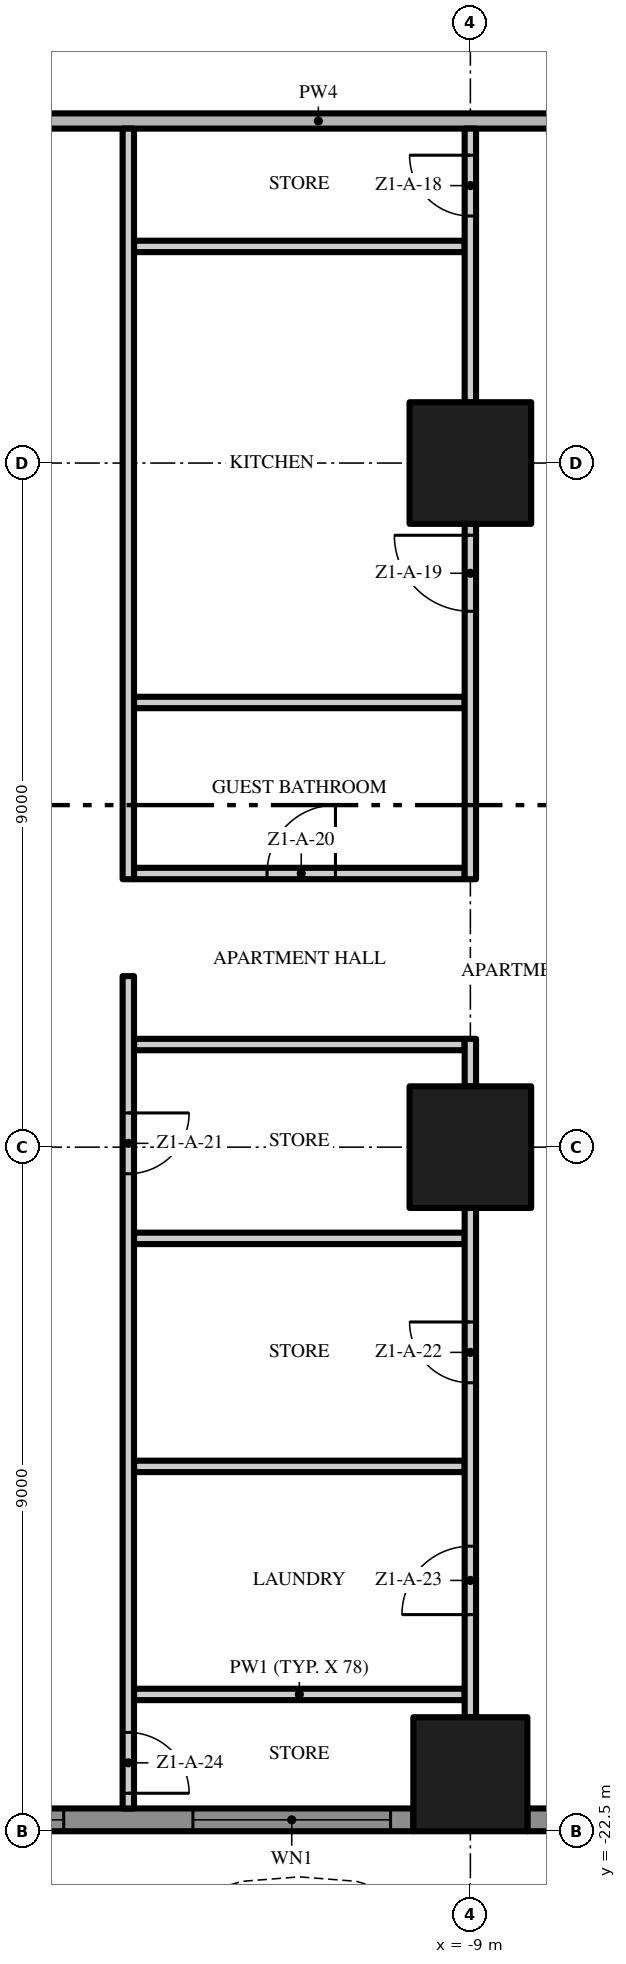
"""IFC4 building model, lengths in metres.
Left out: names, types, materials, properties, quantities, classifications, styles, units other than length and angle.
Written with IfcOpenShell. Run it as: python <this file> out.ifc"""

import sys

from ifc_helpers import new_model, si_unit, direction, frame, frame_2d, origin, origin_2d, place, context, subcontext, project, spatial, polyline, rectangle, outline, extrude, element, fill, save


model = new_model("IFC4")
c1 = context("Model", 3, precision=1e-05, world=origin(), true_north=direction((0.0, 1.0)))
c2 = subcontext(c1, "Body", "Model", "MODEL_VIEW")
j1 = project(units=[si_unit("LENGTHUNIT", "METRE"), si_unit("PLANEANGLEUNIT", "RADIAN")], contexts=[c1])
p1 = place(None, origin())
s1 = spatial("IfcSite", under=j1, at=p1, CompositionType="ELEMENT")
p2 = place(p1, origin())
s2 = spatial("IfcBuilding", under=s1, at=p2, CompositionType="ELEMENT")
p3 = place(p2, frame((0.0, 0.0, 15.0)))
s3 = spatial("IfcBuildingStorey", under=s2, at=p3, CompositionType="ELEMENT", Elevation=15.0)
p4 = place(p3, frame((-9.0, -13.5, 0.0), z_axis=(0.0, 0.0, 1.0), x_axis=(1.0, 0.0, 0.0)))
e1 = element("IfcColumn", 1, at=p4, inside=s3, PredefinedType="COLUMN", context=c2, shape_type="SweptSolid", body=[
    extrude(rectangle(XDim=1.6, YDim=1.6, at=origin_2d()), origin(), (0.0, 0.0, 1.0), 3.5),
])
p5 = place(p3, frame((-9.0, -21.75, 0.0), z_axis=(0.0, 0.0, 1.0), x_axis=(1.0, 0.0, 0.0)))
e2 = element("IfcColumn", 2, at=p5, inside=s3, PredefinedType="COLUMN", context=c2, shape_type="SweptSolid", body=[
    extrude(rectangle(XDim=1.5, YDim=1.5, at=origin_2d()), origin(), (0.0, 0.0, 1.0), 3.5),
])
p6 = place(p3, frame((-9.0, -4.5, 0.0), z_axis=(0.0, 0.0, 1.0), x_axis=(1.0, 0.0, 0.0)))
e3 = element("IfcColumn", 3, at=p6, inside=s3, PredefinedType="COLUMN", context=c2, shape_type="SweptSolid", body=[
    extrude(rectangle(XDim=1.6, YDim=1.6, at=origin_2d()), origin(), (0.0, 0.0, 1.0), 3.5),
])
p7 = place(p3, frame((-9.75, -22.35, 0.0), z_axis=(0.0, 0.0, 1.0), x_axis=(-1.0, 0.0, 0.0)))
e4 = element("IfcWall", 4, at=p7, inside=s3, PredefinedType="SOLIDWALL", context=c2, shape_type="SweptSolid", body=[
    extrude(rectangle(XDim=7.5, YDim=0.3, at=frame_2d((3.75, 0.0))), origin(), (0.0, 0.0, 1.0), 3.5),
])
p8 = place(p7, frame((4.6, 0.0, 0.45)))
e5 = element("IfcOpeningElement", 5, at=p8, cuts=e4, PredefinedType="OPENING", context=c2, shape_type="SweptSolid", body=[
    extrude(rectangle(XDim=2.6, YDim=2.65, at=frame_2d((1.3, 1.325))), frame((0.0, 0.16, 0.0), z_axis=(0.0, -1.0, 0.0), x_axis=(1.0, 0.0, 0.0)), (0.0, 0.0, 1.0), 0.32),
])
p9 = place(p7, frame((0.3, 0.0, 0.45)))
e6 = element("IfcOpeningElement", 6, at=p9, cuts=e4, PredefinedType="OPENING", context=c2, shape_type="SweptSolid", body=[
    extrude(rectangle(XDim=2.6, YDim=2.65, at=frame_2d((1.3, 1.325))), frame((0.0, 0.16, 0.0), z_axis=(0.0, -1.0, 0.0), x_axis=(1.0, 0.0, 0.0)), (0.0, 0.0, 1.0), 0.32),
])
p10 = place(p3, frame((-0.75, -22.35, 0.0), z_axis=(0.0, 0.0, 1.0), x_axis=(-1.0, 0.0, 0.0)))
e7 = element("IfcWall", 7, at=p10, inside=s3, PredefinedType="SOLIDWALL", context=c2, shape_type="SweptSolid", body=[
    extrude(rectangle(XDim=7.5, YDim=0.3, at=frame_2d((3.75, 0.0))), origin(), (0.0, 0.0, 1.0), 3.5),
])
p11 = place(p10, frame((4.6, 0.0, 0.45)))
e8 = element("IfcOpeningElement", 8, at=p11, cuts=e7, PredefinedType="OPENING", context=c2, shape_type="SweptSolid", body=[
    extrude(rectangle(XDim=2.6, YDim=2.65, at=frame_2d((1.3, 1.325))), frame((0.0, 0.16, 0.0), z_axis=(0.0, -1.0, 0.0), x_axis=(1.0, 0.0, 0.0)), (0.0, 0.0, 1.0), 0.32),
])
p12 = place(p10, frame((0.3, 0.0, 0.0)))
e9 = element("IfcOpeningElement", 9, at=p12, cuts=e7, PredefinedType="OPENING", context=c2, shape_type="SweptSolid", body=[
    extrude(rectangle(XDim=2.6, YDim=2.4, at=frame_2d((1.3, 1.2))), frame((0.0, 0.16, 0.0), z_axis=(0.0, -1.0, 0.0), x_axis=(1.0, 0.0, 0.0)), (0.0, 0.0, 1.0), 0.32),
])
p13 = place(p3, origin())
e10 = element("IfcWall", 10, at=p13, inside=s3, PredefinedType="USERDEFINED", context=c2, shape_type="SweptSolid", body=[
    extrude(outline(polyline([(-22.5, -24.3), (-21.0, -25.005), (-19.5, -25.441), (-18.75, -25.5), (-18.0, -25.441), (-16.5, -25.005), (-15.0, -24.3), (-13.5, -23.595), (-12.0, -23.159), (-11.25, -23.1), (-10.5, -23.159), (-9.0, -23.595), (-7.5, -24.3), (-6.0, -25.005), (-4.5, -25.441), (-3.75, -25.5), (-3.0, -25.441), (-1.5, -25.005), (0.0, -24.3), (1.5, -23.595), (3.0, -23.159), (3.75, -23.1), (4.5, -23.159), (6.0, -23.595), (7.5, -24.3), (9.0, -25.005), (10.5, -25.441), (11.25, -25.5), (12.0, -25.441), (13.5, -25.005), (15.0, -24.3), (16.5, -23.595), (18.0, -23.159), (18.75, -23.1), (19.5, -23.159), (21.0, -23.595), (22.5, -24.3), (22.606, -24.074), (21.089, -23.36), (19.545, -22.911), (18.75, -22.849), (17.955, -22.911), (16.411, -23.36), (14.894, -24.074), (13.411, -24.771), (11.955, -25.194), (11.25, -25.249), (10.545, -25.194), (9.089, -24.771), (7.606, -24.074), (6.089, -23.36), (4.545, -22.911), (3.75, -22.849), (2.955, -22.911), (1.411, -23.36), (-0.106, -24.074), (-1.589, -24.771), (-3.045, -25.194), (-3.75, -25.249), (-4.455, -25.194), (-5.911, -24.771), (-7.394, -24.074), (-8.911, -23.36), (-10.455, -22.911), (-11.25, -22.849), (-12.045, -22.911), (-13.589, -23.36), (-15.106, -24.074), (-16.589, -24.771), (-18.045, -25.194), (-18.75, -25.249), (-19.455, -25.194), (-20.911, -24.771), (-22.394, -24.074), (-22.5, -24.3)])), origin(), (0.0, 0.0, 1.0), 0.9),
])
for number, where, z_axis, x_axis in (
    (11, (-13.425, -20.7, 0.0), (0.0, 0.0, 1.0), (1.0, 0.0, 0.0)),
    (12, (-13.425, -17.7, 0.0), (0.0, 0.0, 1.0), (1.0, 0.0, 0.0)),
    (13, (-13.425, -14.7, 0.0), (0.0, 0.0, 1.0), (1.0, 0.0, 0.0)),
    (14, (-13.425, -12.15, 0.0), (0.0, 0.0, 1.0), (1.0, 0.0, 0.0)),
):
    element("IfcWall", number, at=place(p3, frame(where, z_axis=z_axis, x_axis=x_axis)), inside=s3, PredefinedType="PARTITIONING", context=c2, shape_type="SweptSolid", body=[
        extrude(rectangle(XDim=4.35, YDim=0.15, at=frame_2d((2.175, 0.0))), origin(), (0.0, 0.0, 1.0), 3.5),
    ])
p14 = place(p3, frame((-13.425, -9.9, 0.0), z_axis=(0.0, 0.0, 1.0), x_axis=(1.0, 0.0, 0.0)))
e15 = element("IfcWall", 15, at=p14, inside=s3, PredefinedType="PARTITIONING", context=c2, shape_type="SweptSolid", body=[
    extrude(rectangle(XDim=4.35, YDim=0.15, at=frame_2d((2.175, 0.0))), origin(), (0.0, 0.0, 1.0), 3.5),
])
p15 = place(p14, frame((1.75, 0.0, 0.0)))
e16 = element("IfcOpeningElement", 16, at=p15, cuts=e15, PredefinedType="OPENING", context=c2, shape_type="SweptSolid", body=[
    extrude(rectangle(XDim=0.9, YDim=2.1, at=frame_2d((0.45, 1.05))), frame((0.0, 0.085, 0.0), z_axis=(0.0, -1.0, 0.0), x_axis=(1.0, 0.0, 0.0)), (0.0, 0.0, 1.0), 0.17),
])
for number, where, z_axis, x_axis in (
    (17, (-13.425, -7.65, 0.0), (0.0, 0.0, 1.0), (1.0, 0.0, 0.0)),
    (18, (-13.425, -1.65, 0.0), (0.0, 0.0, 1.0), (1.0, 0.0, 0.0)),
):
    element("IfcWall", number, at=place(p3, frame(where, z_axis=z_axis, x_axis=x_axis)), inside=s3, PredefinedType="PARTITIONING", context=c2, shape_type="SweptSolid", body=[
        extrude(rectangle(XDim=4.35, YDim=0.15, at=frame_2d((2.175, 0.0))), origin(), (0.0, 0.0, 1.0), 3.5),
    ])
p16 = place(p3, frame((-17.4, 0.0, 0.0), z_axis=(0.0, 0.0, 1.0), x_axis=(1.0, 0.0, 0.0)))
e19 = element("IfcWall", 19, at=p16, inside=s3, PredefinedType="PARTITIONING", context=c2, shape_type="SweptSolid", body=[
    extrude(rectangle(XDim=12.8, YDim=0.2, at=frame_2d((6.4, 0.0))), origin(), (0.0, 0.0, 1.0), 3.5),
])
p17 = place(p3, frame((-13.5, -11.25, 0.0), z_axis=(0.0, 0.0, 1.0), x_axis=(0.0, -1.0, 0.0)))
e20 = element("IfcWall", 20, at=p17, inside=s3, PredefinedType="PARTITIONING", context=c2, shape_type="SweptSolid", body=[
    extrude(rectangle(XDim=10.95, YDim=0.15, at=frame_2d((5.475, 0.0))), origin(), (0.0, 0.0, 1.0), 3.5),
])
p18 = place(p17, frame((1.8, 0.0, 0.0)))
e21 = element("IfcOpeningElement", 21, at=p18, cuts=e20, PredefinedType="OPENING", context=c2, shape_type="SweptSolid", body=[
    extrude(rectangle(XDim=0.8, YDim=2.0, at=frame_2d((0.4, 1.0))), frame((0.0, 0.085, 0.0), z_axis=(0.0, -1.0, 0.0), x_axis=(1.0, 0.0, 0.0)), (0.0, 0.0, 1.0), 0.17),
])
p19 = place(p17, frame((9.95, 0.0, 0.0)))
e22 = element("IfcOpeningElement", 22, at=p19, cuts=e20, PredefinedType="OPENING", context=c2, shape_type="SweptSolid", body=[
    extrude(rectangle(XDim=0.8, YDim=2.0, at=frame_2d((0.4, 1.0))), frame((0.0, 0.085, 0.0), z_axis=(0.0, -1.0, 0.0), x_axis=(1.0, 0.0, 0.0)), (0.0, 0.0, 1.0), 0.17),
])
p20 = place(p3, frame((-13.5, -9.975, 0.0), z_axis=(0.0, 0.0, 1.0), x_axis=(0.0, 1.0, 0.0)))
e23 = element("IfcWall", 23, at=p20, inside=s3, PredefinedType="PARTITIONING", context=c2, shape_type="SweptSolid", body=[
    extrude(rectangle(XDim=9.875, YDim=0.15, at=frame_2d((4.938, 0.0))), origin(), (0.0, 0.0, 1.0), 3.5),
])
p21 = place(p3, frame((-9.0, -21.0, 0.0), z_axis=(0.0, 0.0, 1.0), x_axis=(0.0, 1.0, 0.0)))
e24 = element("IfcWall", 24, at=p21, inside=s3, PredefinedType="PARTITIONING", context=c2, shape_type="SweptSolid", body=[
    extrude(rectangle(XDim=6.7, YDim=0.15, at=frame_2d((3.35, 0.0))), origin(), (0.0, 0.0, 1.0), 3.5),
])
p22 = place(p21, frame((4.4, 0.0, 0.0)))
e25 = element("IfcOpeningElement", 25, at=p22, cuts=e24, PredefinedType="OPENING", context=c2, shape_type="SweptSolid", body=[
    extrude(rectangle(XDim=0.8, YDim=2.0, at=frame_2d((0.4, 1.0))), frame((0.0, 0.085, 0.0), z_axis=(0.0, -1.0, 0.0), x_axis=(1.0, 0.0, 0.0)), (0.0, 0.0, 1.0), 0.17),
])
p23 = place(p21, frame((1.35, 0.0, 0.0)))
e26 = element("IfcOpeningElement", 26, at=p23, cuts=e24, PredefinedType="OPENING", context=c2, shape_type="SweptSolid", body=[
    extrude(rectangle(XDim=0.9, YDim=2.1, at=frame_2d((0.45, 1.05))), frame((0.0, 0.085, 0.0), z_axis=(0.0, -1.0, 0.0), x_axis=(1.0, 0.0, 0.0)), (0.0, 0.0, 1.0), 0.17),
])
p24 = place(p3, frame((-9.0, -12.7, 0.0), z_axis=(0.0, 0.0, 1.0), x_axis=(0.0, 1.0, 0.0)))
e27 = element("IfcWall", 27, at=p24, inside=s3, PredefinedType="PARTITIONING", context=c2, shape_type="SweptSolid", body=[
    extrude(rectangle(XDim=0.625, YDim=0.15, at=frame_2d((0.312, 0.0))), origin(), (0.0, 0.0, 1.0), 3.5),
])
p25 = place(p3, frame((-9.0, -9.975, 0.0), z_axis=(0.0, 0.0, 1.0), x_axis=(0.0, 1.0, 0.0)))
e28 = element("IfcWall", 28, at=p25, inside=s3, PredefinedType="PARTITIONING", context=c2, shape_type="SweptSolid", body=[
    extrude(rectangle(XDim=4.675, YDim=0.15, at=frame_2d((2.337, 0.0))), origin(), (0.0, 0.0, 1.0), 3.5),
])
p26 = place(p25, frame((3.525, 0.0, 0.0)))
e29 = element("IfcOpeningElement", 29, at=p26, cuts=e28, PredefinedType="OPENING", context=c2, shape_type="SweptSolid", body=[
    extrude(rectangle(XDim=1.0, YDim=2.4, at=frame_2d((0.5, 1.2))), frame((0.0, 0.085, 0.0), z_axis=(0.0, -1.0, 0.0), x_axis=(1.0, 0.0, 0.0)), (0.0, 0.0, 1.0), 0.17),
])
p27 = place(p3, frame((-9.0, -3.7, 0.0), z_axis=(0.0, 0.0, 1.0), x_axis=(0.0, 1.0, 0.0)))
e30 = element("IfcWall", 30, at=p27, inside=s3, PredefinedType="PARTITIONING", context=c2, shape_type="SweptSolid", body=[
    extrude(rectangle(XDim=3.6, YDim=0.15, at=frame_2d((1.8, 0.0))), origin(), (0.0, 0.0, 1.0), 3.5),
])
p28 = place(p27, frame((2.45, 0.0, 0.0)))
e31 = element("IfcOpeningElement", 31, at=p28, cuts=e30, PredefinedType="OPENING", context=c2, shape_type="SweptSolid", body=[
    extrude(rectangle(XDim=0.8, YDim=2.0, at=frame_2d((0.4, 1.0))), frame((0.0, 0.085, 0.0), z_axis=(0.0, -1.0, 0.0), x_axis=(1.0, 0.0, 0.0)), (0.0, 0.0, 1.0), 0.17),
])
p29 = place(p8, origin())
e32 = element("IfcWindow", 32, at=p29, inside=s3, PartitioningType="SINGLE_PANEL", PredefinedType="WINDOW", context=c2, shape_type="SweptSolid", body=[
    extrude(rectangle(XDim=2.6, YDim=2.65, at=frame_2d((1.3, 1.325))), frame((0.0, 0.03, 0.0), z_axis=(0.0, -1.0, 0.0), x_axis=(1.0, 0.0, 0.0)), (0.0, 0.0, 1.0), 0.06),
])
fill(e5, e32)
p30 = place(p9, origin())
e33 = element("IfcWindow", 33, at=p30, inside=s3, PartitioningType="SINGLE_PANEL", PredefinedType="WINDOW", context=c2, shape_type="SweptSolid", body=[
    extrude(rectangle(XDim=2.6, YDim=2.65, at=frame_2d((1.3, 1.325))), frame((0.0, 0.03, 0.0), z_axis=(0.0, -1.0, 0.0), x_axis=(1.0, 0.0, 0.0)), (0.0, 0.0, 1.0), 0.06),
])
fill(e6, e33)
p31 = place(p28, origin())
e34 = element("IfcDoor", 34, at=p31, inside=s3, OperationType="SINGLE_SWING_RIGHT", PredefinedType="DOOR", context=c2, shape_type="SweptSolid", body=[
    extrude(rectangle(XDim=0.8, YDim=2.0, at=frame_2d((0.4, 1.0))), frame((0.0, 0.025, 0.0), z_axis=(0.0, -1.0, 0.0), x_axis=(1.0, 0.0, 0.0)), (0.0, 0.0, 1.0), 0.05),
])
fill(e31, e34)
p32 = place(p26, origin())
e35 = element("IfcDoor", 35, at=p32, inside=s3, OperationType="SINGLE_SWING_RIGHT", PredefinedType="DOOR", context=c2, shape_type="SweptSolid", body=[
    extrude(rectangle(XDim=1.0, YDim=2.4, at=frame_2d((0.5, 1.2))), frame((0.0, 0.025, 0.0), z_axis=(0.0, -1.0, 0.0), x_axis=(1.0, 0.0, 0.0)), (0.0, 0.0, 1.0), 0.05),
])
fill(e29, e35)
p33 = place(p15, origin())
e36 = element("IfcDoor", 36, at=p33, inside=s3, OperationType="SINGLE_SWING_RIGHT", PredefinedType="DOOR", context=c2, shape_type="SweptSolid", body=[
    extrude(rectangle(XDim=0.9, YDim=2.1, at=frame_2d((0.45, 1.05))), frame((0.0, 0.025, 0.0), z_axis=(0.0, -1.0, 0.0), x_axis=(1.0, 0.0, 0.0)), (0.0, 0.0, 1.0), 0.05),
])
fill(e16, e36)
p34 = place(p18, origin())
e37 = element("IfcDoor", 37, at=p34, inside=s3, OperationType="SINGLE_SWING_LEFT", PredefinedType="DOOR", context=c2, shape_type="SweptSolid", body=[
    extrude(rectangle(XDim=0.8, YDim=2.0, at=frame_2d((0.4, 1.0))), frame((0.0, 0.025, 0.0), z_axis=(0.0, -1.0, 0.0), x_axis=(1.0, 0.0, 0.0)), (0.0, 0.0, 1.0), 0.05),
])
fill(e21, e37)
p35 = place(p22, origin())
e38 = element("IfcDoor", 38, at=p35, inside=s3, OperationType="SINGLE_SWING_RIGHT", PredefinedType="DOOR", context=c2, shape_type="SweptSolid", body=[
    extrude(rectangle(XDim=0.8, YDim=2.0, at=frame_2d((0.4, 1.0))), frame((0.0, 0.025, 0.0), z_axis=(0.0, -1.0, 0.0), x_axis=(1.0, 0.0, 0.0)), (0.0, 0.0, 1.0), 0.05),
])
fill(e25, e38)
p36 = place(p23, origin())
e39 = element("IfcDoor", 39, at=p36, inside=s3, OperationType="SINGLE_SWING_LEFT", PredefinedType="DOOR", context=c2, shape_type="SweptSolid", body=[
    extrude(rectangle(XDim=0.9, YDim=2.1, at=frame_2d((0.45, 1.05))), frame((0.0, 0.025, 0.0), z_axis=(0.0, -1.0, 0.0), x_axis=(1.0, 0.0, 0.0)), (0.0, 0.0, 1.0), 0.05),
])
fill(e26, e39)
p37 = place(p19, origin())
e40 = element("IfcDoor", 40, at=p37, inside=s3, OperationType="SINGLE_SWING_RIGHT", PredefinedType="DOOR", context=c2, shape_type="SweptSolid", body=[
    extrude(rectangle(XDim=0.8, YDim=2.0, at=frame_2d((0.4, 1.0))), frame((0.0, 0.025, 0.0), z_axis=(0.0, -1.0, 0.0), x_axis=(1.0, 0.0, 0.0)), (0.0, 0.0, 1.0), 0.05),
])
fill(e22, e40)
save(model, sys.argv[1])
